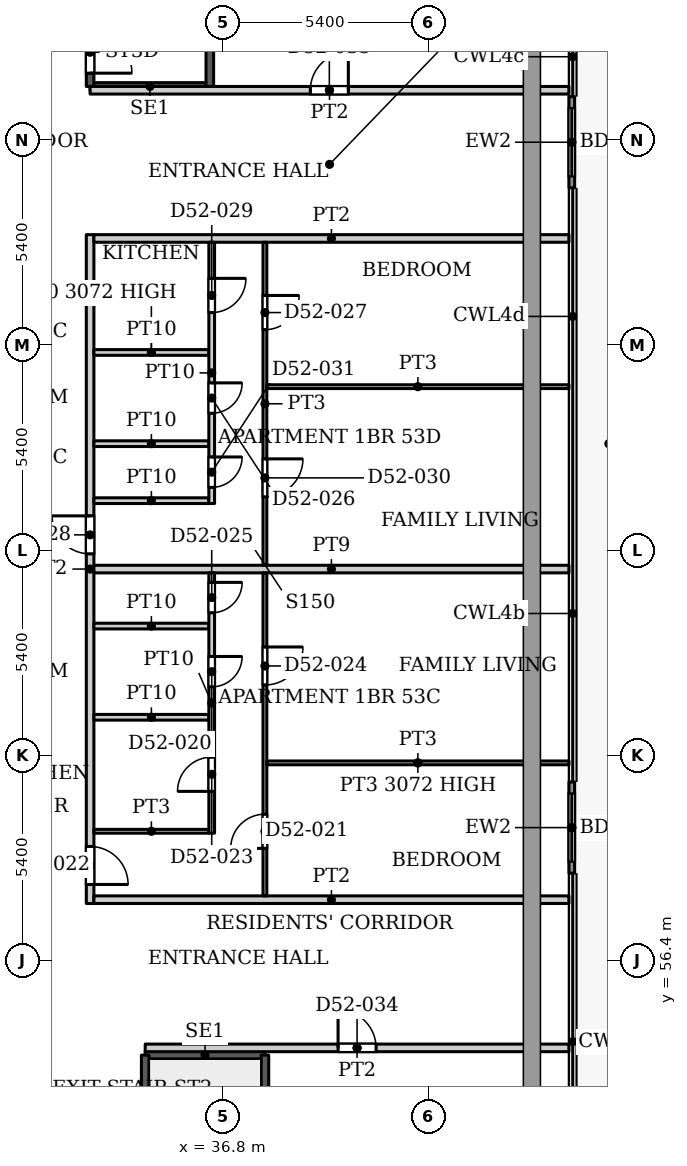
"""IFC4 building model, lengths in metres.
Left out: names, types, materials, properties, quantities, classifications, styles, units other than length and angle.
Written with IfcOpenShell. Run it as: python <this file> out.ifc"""

import sys

from ifc_helpers import new_model, si_unit, direction, frame, frame_2d, origin, place, context, subcontext, project, spatial, rectangle, extrude, source, transform, mapped, element, fill, save


model = new_model("IFC4")
c1 = context("Model", 3, precision=1e-05, world=origin(), true_north=direction((0.0, 1.0)))
c2 = subcontext(c1, "Body", "Model", "MODEL_VIEW")
j1 = project(units=[si_unit("LENGTHUNIT", "METRE"), si_unit("PLANEANGLEUNIT", "RADIAN")], contexts=[c1])
p1 = place(None, origin())
s1 = spatial("IfcSite", under=j1, at=p1, CompositionType="ELEMENT")
p2 = place(p1, origin())
s2 = spatial("IfcBuilding", under=s1, at=p2, CompositionType="ELEMENT")
p3 = place(p2, frame((0.0, 0.0, 227.9)))
s3 = spatial("IfcBuildingStorey", under=s2, at=p3, CompositionType="ELEMENT", Elevation=227.9)
p4 = place(p3, frame((45.975, 79.132, 0.0), z_axis=(0.0, 0.0, 1.0), x_axis=(0.0, -1.0, 0.0)))
e1 = element("IfcWall", 1, at=p4, inside=s3, PredefinedType="SOLIDWALL", context=c2, shape_type="SweptSolid", body=[
    extrude(rectangle(XDim=2.399, YDim=0.15, at=frame_2d((1.2, 0.0))), origin(), (0.0, 0.0, 1.0), 3.75),
])
p5 = place(p4, frame((0.3, 0.0, 0.0)))
e2 = element("IfcOpeningElement", 2, at=p5, cuts=e1, PredefinedType="OPENING", context=c2, shape_type="SweptSolid", body=[
    extrude(rectangle(XDim=1.8, YDim=2.4, at=frame_2d((0.9, 1.2))), frame((0.0, 0.085, 0.0), z_axis=(0.0, -1.0, 0.0), x_axis=(1.0, 0.0, 0.0)), (0.0, 0.0, 1.0), 0.17),
])
p6 = place(p3, frame((45.975, 61.097, 0.0), z_axis=(0.0, 0.0, 1.0), x_axis=(0.0, -1.0, 0.0)))
e3 = element("IfcWall", 3, at=p6, inside=s3, PredefinedType="SOLIDWALL", context=c2, shape_type="SweptSolid", body=[
    extrude(rectangle(XDim=2.4, YDim=0.15, at=frame_2d((1.2, 0.0))), origin(), (0.0, 0.0, 1.0), 3.75),
])
p7 = place(p6, frame((0.3, 0.0, 0.0)))
e4 = element("IfcOpeningElement", 4, at=p7, cuts=e3, PredefinedType="OPENING", context=c2, shape_type="SweptSolid", body=[
    extrude(rectangle(XDim=1.8, YDim=2.4, at=frame_2d((0.9, 1.2))), frame((0.0, 0.085, 0.0), z_axis=(0.0, -1.0, 0.0), x_axis=(1.0, 0.0, 0.0)), (0.0, 0.0, 1.0), 0.17),
])
p8 = place(p3, frame((34.75, 53.91, 0.0), z_axis=(0.0, 0.0, 1.0), x_axis=(1.0, 0.0, 0.0)))
e5 = element("IfcWall", 5, at=p8, inside=s3, PredefinedType="SHEAR", context=c2, shape_type="SweptSolid", body=[
    extrude(rectangle(XDim=3.15, YDim=0.2, at=frame_2d((1.575, 0.0))), origin(), (0.0, 0.0, 1.0), 3.9),
])
p9 = place(p3, frame((34.75, 47.5, 0.0), z_axis=(0.0, 0.0, 1.0), x_axis=(0.0, 1.0, 0.0)))
e6 = element("IfcWall", 6, at=p9, inside=s3, PredefinedType="SHEAR", context=c2, shape_type="SweptSolid", body=[
    extrude(rectangle(XDim=6.41, YDim=0.2, at=frame_2d((3.205, 0.0))), origin(), (0.0, 0.0, 1.0), 3.9),
])
p10 = place(p3, frame((37.9, 44.75, 0.0), z_axis=(0.0, 0.0, 1.0), x_axis=(0.0, 1.0, 0.0)))
e7 = element("IfcWall", 7, at=p10, inside=s3, PredefinedType="SHEAR", context=c2, shape_type="SweptSolid", body=[
    extrude(rectangle(XDim=9.16, YDim=0.2, at=frame_2d((4.58, 0.0))), origin(), (0.0, 0.0, 1.0), 3.9),
])
p11 = place(p3, frame((33.3, 79.4, 0.0), z_axis=(0.0, 0.0, 1.0), x_axis=(1.0, 0.0, 0.0)))
e8 = element("IfcWall", 8, at=p11, inside=s3, PredefinedType="SHEAR", context=c2, shape_type="SweptSolid", body=[
    extrude(rectangle(XDim=3.15, YDim=0.2, at=frame_2d((1.575, 0.0))), origin(), (0.0, 0.0, 1.0), 3.9),
])
p12 = place(p3, frame((33.3, 79.4, 0.0), z_axis=(0.0, 0.0, 1.0), x_axis=(0.0, 1.0, 0.0)))
e9 = element("IfcWall", 9, at=p12, inside=s3, PredefinedType="SHEAR", context=c2, shape_type="SweptSolid", body=[
    extrude(rectangle(XDim=9.16, YDim=0.2, at=frame_2d((4.58, 0.0))), origin(), (0.0, 0.0, 1.0), 3.9),
])
p13 = place(p12, frame((0.35, 0.0, 0.0)))
e10 = element("IfcOpeningElement", 10, at=p13, cuts=e9, PredefinedType="OPENING", context=c2, shape_type="SweptSolid", body=[
    extrude(rectangle(XDim=1.1, YDim=2.2, at=frame_2d((0.55, 1.1))), frame((0.0, 0.11, 0.0), z_axis=(0.0, -1.0, 0.0), x_axis=(1.0, 0.0, 0.0)), (0.0, 0.0, 1.0), 0.22),
])
p14 = place(p3, frame((36.45, 79.4, 0.0), z_axis=(0.0, 0.0, 1.0), x_axis=(0.0, 1.0, 0.0)))
e11 = element("IfcWall", 11, at=p14, inside=s3, PredefinedType="SHEAR", context=c2, shape_type="SweptSolid", body=[
    extrude(rectangle(XDim=9.16, YDim=0.2, at=frame_2d((4.58, 0.0))), origin(), (0.0, 0.0, 1.0), 3.9),
])
p15 = place(p3, frame((33.3, 57.9, 0.0), z_axis=(0.0, 0.0, 1.0), x_axis=(0.0, 1.0, 0.0)))
e12 = element("IfcWall", 12, at=p15, inside=s3, PredefinedType="PARTITIONING", context=c2, shape_type="SweptSolid", body=[
    extrude(rectangle(XDim=17.6, YDim=0.2, at=frame_2d((8.8, 0.0))), origin(), (0.0, 0.0, 1.0), 3.6),
])
p16 = place(p15, frame((0.5, 0.0, 0.0)))
e13 = element("IfcOpeningElement", 13, at=p16, cuts=e12, PredefinedType="OPENING", context=c2, shape_type="SweptSolid", body=[
    extrude(rectangle(XDim=1.0, YDim=2.1, at=frame_2d((0.5, 1.05))), frame((0.0, 0.11, 0.0), z_axis=(0.0, -1.0, 0.0), x_axis=(1.0, 0.0, 0.0)), (0.0, 0.0, 1.0), 0.22),
])
p17 = place(p15, frame((9.2, 0.0, 0.0)))
e14 = element("IfcOpeningElement", 14, at=p17, cuts=e12, PredefinedType="OPENING", context=c2, shape_type="SweptSolid", body=[
    extrude(rectangle(XDim=1.0, YDim=2.1, at=frame_2d((0.5, 1.05))), frame((0.0, 0.11, 0.0), z_axis=(0.0, -1.0, 0.0), x_axis=(1.0, 0.0, 0.0)), (0.0, 0.0, 1.0), 0.22),
])
p18 = place(p3, frame((33.3, 79.3, 0.0), z_axis=(0.0, 0.0, 1.0), x_axis=(1.0, 0.0, 0.0)))
e15 = element("IfcWall", 15, at=p18, inside=s3, PredefinedType="PARTITIONING", context=c2, shape_type="SweptSolid", body=[
    extrude(rectangle(XDim=12.6, YDim=0.2, at=frame_2d((6.3, 0.0))), origin(), (0.0, 0.0, 1.0), 3.6),
])
p19 = place(p18, frame((5.795, 0.0, 0.0)))
e16 = element("IfcOpeningElement", 16, at=p19, cuts=e15, PredefinedType="OPENING", context=c2, shape_type="SweptSolid", body=[
    extrude(rectangle(XDim=1.0, YDim=2.1, at=frame_2d((0.5, 1.05))), frame((0.0, 0.11, 0.0), z_axis=(0.0, -1.0, 0.0), x_axis=(1.0, 0.0, 0.0)), (0.0, 0.0, 1.0), 0.22),
])
p20 = place(p3, frame((33.4, 58.0, 0.0), z_axis=(0.0, 0.0, 1.0), x_axis=(1.0, 0.0, 0.0)))
e17 = element("IfcWall", 17, at=p20, inside=s3, PredefinedType="PARTITIONING", context=c2, shape_type="SweptSolid", body=[
    extrude(rectangle(XDim=12.5, YDim=0.2, at=frame_2d((6.25, 0.0))), origin(), (0.0, 0.0, 1.0), 3.6),
])
p21 = place(p3, frame((33.4, 59.8, 0.0), z_axis=(0.0, 0.0, 1.0), x_axis=(1.0, 0.0, 0.0)))
e18 = element("IfcWall", 18, at=p21, inside=s3, PredefinedType="PARTITIONING", context=c2, shape_type="SweptSolid", body=[
    extrude(rectangle(XDim=3.025, YDim=0.1, at=frame_2d((1.513, 0.0))), origin(), (0.0, 0.0, 1.0), 3.6),
])
for number, where, z_axis, x_axis in (
    (19, (33.4, 62.8, 0.0), (0.0, 0.0, 1.0), (1.0, 0.0, 0.0)),
    (20, (33.4, 65.2, 0.0), (0.0, 0.0, 1.0), (1.0, 0.0, 0.0)),
):
    element("IfcWall", number, at=place(p3, frame(where, z_axis=z_axis, x_axis=x_axis)), inside=s3, PredefinedType="PARTITIONING", context=c2, shape_type="SweptSolid", body=[
        extrude(rectangle(XDim=3.025, YDim=0.15, at=frame_2d((1.513, 0.0))), origin(), (0.0, 0.0, 1.0), 3.6),
    ])
p22 = place(p3, frame((33.4, 66.7, 0.0), z_axis=(0.0, 0.0, 1.0), x_axis=(1.0, 0.0, 0.0)))
e21 = element("IfcWall", 21, at=p22, inside=s3, PredefinedType="PARTITIONING", context=c2, shape_type="SweptSolid", body=[
    extrude(rectangle(XDim=12.5, YDim=0.2, at=frame_2d((6.25, 0.0))), origin(), (0.0, 0.0, 1.0), 3.6),
])
for number, where, z_axis, x_axis in (
    (22, (33.4, 68.5, 0.0), (0.0, 0.0, 1.0), (1.0, 0.0, 0.0)),
    (23, (33.4, 70.0, 0.0), (0.0, 0.0, 1.0), (1.0, 0.0, 0.0)),
):
    element("IfcWall", number, at=place(p3, frame(where, z_axis=z_axis, x_axis=x_axis)), inside=s3, PredefinedType="PARTITIONING", context=c2, shape_type="SweptSolid", body=[
        extrude(rectangle(XDim=3.025, YDim=0.15, at=frame_2d((1.513, 0.0))), origin(), (0.0, 0.0, 1.0), 3.6),
    ])
p23 = place(p3, frame((33.4, 72.4, 0.0), z_axis=(0.0, 0.0, 1.0), x_axis=(1.0, 0.0, 0.0)))
e24 = element("IfcWall", 24, at=p23, inside=s3, PredefinedType="PARTITIONING", context=c2, shape_type="SweptSolid", body=[
    extrude(rectangle(XDim=3.025, YDim=0.15, at=frame_2d((1.513, 0.0))), origin(), (0.0, 0.0, 1.0), 3.072),
])
p24 = place(p3, frame((33.4, 75.4, 0.0), z_axis=(0.0, 0.0, 1.0), x_axis=(1.0, 0.0, 0.0)))
e25 = element("IfcWall", 25, at=p24, inside=s3, PredefinedType="PARTITIONING", context=c2, shape_type="SweptSolid", body=[
    extrude(rectangle(XDim=12.5, YDim=0.2, at=frame_2d((6.25, 0.0))), origin(), (0.0, 0.0, 1.0), 3.6),
])
p25 = place(p3, frame((34.75, 54.1, 0.0), z_axis=(0.0, 0.0, 1.0), x_axis=(1.0, 0.0, 0.0)))
e26 = element("IfcWall", 26, at=p25, inside=s3, PredefinedType="PARTITIONING", context=c2, shape_type="SweptSolid", body=[
    extrude(rectangle(XDim=11.15, YDim=0.2, at=frame_2d((5.575, 0.0))), origin(), (0.0, 0.0, 1.0), 3.6),
])
p26 = place(p25, frame((5.075, 0.0, 0.0)))
e27 = element("IfcOpeningElement", 27, at=p26, cuts=e26, PredefinedType="OPENING", context=c2, shape_type="SweptSolid", body=[
    extrude(rectangle(XDim=1.0, YDim=2.1, at=frame_2d((0.5, 1.05))), frame((0.0, 0.11, 0.0), z_axis=(0.0, -1.0, 0.0), x_axis=(1.0, 0.0, 0.0)), (0.0, 0.0, 1.0), 0.22),
])
p27 = place(p3, frame((36.5, 59.75, 0.0), z_axis=(0.0, 0.0, 1.0), x_axis=(0.0, 1.0, 0.0)))
e28 = element("IfcWall", 28, at=p27, inside=s3, PredefinedType="PARTITIONING", context=c2, shape_type="SweptSolid", body=[
    extrude(rectangle(XDim=6.85, YDim=0.15, at=frame_2d((3.425, 0.0))), origin(), (0.0, 0.0, 1.0), 3.6),
])
p28 = place(p27, frame((3.85, 0.0, 0.0)))
e29 = element("IfcOpeningElement", 29, at=p28, cuts=e28, PredefinedType="OPENING", context=c2, shape_type="SweptSolid", body=[
    extrude(rectangle(XDim=0.8, YDim=2.1, at=frame_2d((0.4, 1.05))), frame((0.0, 0.085, 0.0), z_axis=(0.0, -1.0, 0.0), x_axis=(1.0, 0.0, 0.0)), (0.0, 0.0, 1.0), 0.17),
])
p29 = place(p27, frame((1.1, 0.0, 0.0)))
e30 = element("IfcOpeningElement", 30, at=p29, cuts=e28, PredefinedType="OPENING", context=c2, shape_type="SweptSolid", body=[
    extrude(rectangle(XDim=0.9, YDim=2.1, at=frame_2d((0.45, 1.05))), frame((0.0, 0.085, 0.0), z_axis=(0.0, -1.0, 0.0), x_axis=(1.0, 0.0, 0.0)), (0.0, 0.0, 1.0), 0.17),
])
p30 = place(p27, frame((5.8, 0.0, 0.0)))
e31 = element("IfcOpeningElement", 31, at=p30, cuts=e28, PredefinedType="OPENING", context=c2, shape_type="SweptSolid", body=[
    extrude(rectangle(XDim=0.8, YDim=2.1, at=frame_2d((0.4, 1.05))), frame((0.0, 0.085, 0.0), z_axis=(0.0, -1.0, 0.0), x_axis=(1.0, 0.0, 0.0)), (0.0, 0.0, 1.0), 0.17),
])
p31 = place(p3, frame((36.5, 68.425, 0.0), z_axis=(0.0, 0.0, 1.0), x_axis=(0.0, 1.0, 0.0)))
e32 = element("IfcWall", 32, at=p31, inside=s3, PredefinedType="PARTITIONING", context=c2, shape_type="SweptSolid", body=[
    extrude(rectangle(XDim=6.875, YDim=0.15, at=frame_2d((3.438, 0.0))), origin(), (0.0, 0.0, 1.0), 3.6),
])
p32 = place(p31, frame((2.375, 0.0, 0.0)))
e33 = element("IfcOpeningElement", 33, at=p32, cuts=e32, PredefinedType="OPENING", context=c2, shape_type="SweptSolid", body=[
    extrude(rectangle(XDim=0.8, YDim=2.1, at=frame_2d((0.4, 1.05))), frame((0.0, 0.085, 0.0), z_axis=(0.0, -1.0, 0.0), x_axis=(1.0, 0.0, 0.0)), (0.0, 0.0, 1.0), 0.17),
])
p33 = place(p31, frame((5.025, 0.0, 0.0)))
e34 = element("IfcOpeningElement", 34, at=p33, cuts=e32, PredefinedType="OPENING", context=c2, shape_type="SweptSolid", body=[
    extrude(rectangle(XDim=0.9, YDim=2.1, at=frame_2d((0.45, 1.05))), frame((0.0, 0.085, 0.0), z_axis=(0.0, -1.0, 0.0), x_axis=(1.0, 0.0, 0.0)), (0.0, 0.0, 1.0), 0.17),
])
p34 = place(p31, frame((0.425, 0.0, 0.0)))
e35 = element("IfcOpeningElement", 35, at=p34, cuts=e32, PredefinedType="OPENING", context=c2, shape_type="SweptSolid", body=[
    extrude(rectangle(XDim=0.8, YDim=2.1, at=frame_2d((0.4, 1.05))), frame((0.0, 0.085, 0.0), z_axis=(0.0, -1.0, 0.0), x_axis=(1.0, 0.0, 0.0)), (0.0, 0.0, 1.0), 0.17),
])
p35 = place(p3, frame((37.9, 58.1, 0.0), z_axis=(0.0, 0.0, 1.0), x_axis=(0.0, 1.0, 0.0)))
e36 = element("IfcWall", 36, at=p35, inside=s3, PredefinedType="PARTITIONING", context=c2, shape_type="SweptSolid", body=[
    extrude(rectangle(XDim=8.5, YDim=0.1, at=frame_2d((4.25, 0.0))), origin(), (0.0, 0.0, 1.0), 3.6),
])
p36 = place(p35, frame((1.25, 0.0, 0.0)))
e37 = element("IfcOpeningElement", 37, at=p36, cuts=e36, PredefinedType="OPENING", context=c2, shape_type="SweptSolid", body=[
    extrude(rectangle(XDim=0.9, YDim=2.1, at=frame_2d((0.45, 1.05))), frame((0.0, 0.06, 0.0), z_axis=(0.0, -1.0, 0.0), x_axis=(1.0, 0.0, 0.0)), (0.0, 0.0, 1.0), 0.12),
])
p37 = place(p35, frame((5.55, 0.0, 0.0)))
e38 = element("IfcOpeningElement", 38, at=p37, cuts=e36, PredefinedType="OPENING", context=c2, shape_type="SweptSolid", body=[
    extrude(rectangle(XDim=1.0, YDim=2.1, at=frame_2d((0.5, 1.05))), frame((0.0, 0.06, 0.0), z_axis=(0.0, -1.0, 0.0), x_axis=(1.0, 0.0, 0.0)), (0.0, 0.0, 1.0), 0.12),
])
p38 = place(p3, frame((37.9, 66.8, 0.0), z_axis=(0.0, 0.0, 1.0), x_axis=(0.0, 1.0, 0.0)))
e39 = element("IfcWall", 39, at=p38, inside=s3, PredefinedType="PARTITIONING", context=c2, shape_type="SweptSolid", body=[
    extrude(rectangle(XDim=8.5, YDim=0.1, at=frame_2d((4.25, 0.0))), origin(), (0.0, 0.0, 1.0), 3.6),
])
p39 = place(p38, frame((6.2, 0.0, 0.0)))
e40 = element("IfcOpeningElement", 40, at=p39, cuts=e39, PredefinedType="OPENING", context=c2, shape_type="SweptSolid", body=[
    extrude(rectangle(XDim=0.9, YDim=2.1, at=frame_2d((0.45, 1.05))), frame((0.0, 0.06, 0.0), z_axis=(0.0, -1.0, 0.0), x_axis=(1.0, 0.0, 0.0)), (0.0, 0.0, 1.0), 0.12),
])
p40 = place(p38, frame((1.8, 0.0, 0.0)))
e41 = element("IfcOpeningElement", 41, at=p40, cuts=e39, PredefinedType="OPENING", context=c2, shape_type="SweptSolid", body=[
    extrude(rectangle(XDim=1.0, YDim=2.1, at=frame_2d((0.5, 1.05))), frame((0.0, 0.06, 0.0), z_axis=(0.0, -1.0, 0.0), x_axis=(1.0, 0.0, 0.0)), (0.0, 0.0, 1.0), 0.12),
])
p41 = place(p3, frame((37.95, 61.6, 0.0), z_axis=(0.0, 0.0, 1.0), x_axis=(1.0, 0.0, 0.0)))
e42 = element("IfcWall", 42, at=p41, inside=s3, PredefinedType="PARTITIONING", context=c2, shape_type="SweptSolid", body=[
    extrude(rectangle(XDim=7.95, YDim=0.1, at=frame_2d((3.975, 0.0))), origin(), (0.0, 0.0, 1.0), 3.072),
])
p42 = place(p3, frame((37.95, 71.5, 0.0), z_axis=(0.0, 0.0, 1.0), x_axis=(1.0, 0.0, 0.0)))
e43 = element("IfcWall", 43, at=p42, inside=s3, PredefinedType="PARTITIONING", context=c2, shape_type="SweptSolid", body=[
    extrude(rectangle(XDim=7.95, YDim=0.1, at=frame_2d((3.975, 0.0))), origin(), (0.0, 0.0, 1.0), 3.6),
])
m1 = source(origin(), c2, "Body", "SweptSolid", [
    extrude(rectangle(XDim=1.8, YDim=2.4, at=frame_2d((0.9, 1.2))), frame((0.0, 0.025, 0.0), z_axis=(0.0, -1.0, 0.0), x_axis=(1.0, 0.0, 0.0)), (0.0, 0.0, 1.0), 0.05),
])
p43 = place(p5, origin())
e44 = element("IfcDoor", 44, at=p43, inside=s3, OperationType="SLIDING_TO_LEFT", PredefinedType="DOOR", context=c2, shape_type="MappedRepresentation", body=[
    mapped(m1, transform((0.0, 0.0, 0.0), x_axis=(1.0, 0.0, 0.0), y_axis=(0.0, 1.0, 0.0), z_axis=(0.0, 0.0, 1.0), scale=1.0)),
])
fill(e2, e44)
p44 = place(p7, origin())
e45 = element("IfcDoor", 45, at=p44, inside=s3, OperationType="SLIDING_TO_LEFT", PredefinedType="DOOR", context=c2, shape_type="MappedRepresentation", body=[
    mapped(m1, transform((0.0, 0.0, 0.0), x_axis=(1.0, 0.0, 0.0), y_axis=(0.0, 1.0, 0.0), z_axis=(0.0, 0.0, 1.0), scale=1.0)),
])
fill(e4, e45)
m2 = source(origin(), c2, "Body", "SweptSolid", [
    extrude(rectangle(XDim=1.1, YDim=2.2, at=frame_2d((0.55, 1.1))), frame((0.0, 0.025, 0.0), z_axis=(0.0, -1.0, 0.0), x_axis=(1.0, 0.0, 0.0)), (0.0, 0.0, 1.0), 0.05),
])
p45 = place(p13, origin())
e46 = element("IfcDoor", 46, at=p45, inside=s3, OperationType="SINGLE_SWING_RIGHT", PredefinedType="DOOR", context=c2, shape_type="MappedRepresentation", body=[
    mapped(m2, transform((0.0, 0.0, 0.0), x_axis=(1.0, 0.0, 0.0), y_axis=(0.0, 1.0, 0.0), z_axis=(0.0, 0.0, 1.0), scale=1.0)),
])
fill(e10, e46)
m3 = source(origin(), c2, "Body", "SweptSolid", [
    extrude(rectangle(XDim=0.8, YDim=2.1, at=frame_2d((0.4, 1.05))), frame((0.0, 0.025, 0.0), z_axis=(0.0, -1.0, 0.0), x_axis=(1.0, 0.0, 0.0)), (0.0, 0.0, 1.0), 0.05),
])
p46 = place(p28, origin())
e47 = element("IfcDoor", 47, at=p46, inside=s3, OperationType="SINGLE_SWING_RIGHT", PredefinedType="DOOR", context=c2, shape_type="MappedRepresentation", body=[
    mapped(m3, transform((0.0, 0.0, 0.0), x_axis=(1.0, 0.0, 0.0), y_axis=(0.0, 1.0, 0.0), z_axis=(0.0, 0.0, 1.0), scale=1.0)),
])
fill(e29, e47)
m4 = source(origin(), c2, "Body", "SweptSolid", [
    extrude(rectangle(XDim=0.9, YDim=2.1, at=frame_2d((0.45, 1.05))), frame((0.0, 0.025, 0.0), z_axis=(0.0, -1.0, 0.0), x_axis=(1.0, 0.0, 0.0)), (0.0, 0.0, 1.0), 0.05),
])
p47 = place(p36, origin())
e48 = element("IfcDoor", 48, at=p47, inside=s3, OperationType="SINGLE_SWING_LEFT", PredefinedType="DOOR", context=c2, shape_type="MappedRepresentation", body=[
    mapped(m4, transform((0.0, 0.0, 0.0), x_axis=(1.0, 0.0, 0.0), y_axis=(0.0, 1.0, 0.0), z_axis=(0.0, 0.0, 1.0), scale=1.0)),
])
fill(e37, e48)
m5 = source(origin(), c2, "Body", "SweptSolid", [
    extrude(rectangle(XDim=1.0, YDim=2.1, at=frame_2d((0.5, 1.05))), frame((0.0, 0.025, 0.0), z_axis=(0.0, -1.0, 0.0), x_axis=(1.0, 0.0, 0.0)), (0.0, 0.0, 1.0), 0.05),
])
p48 = place(p16, origin())
e49 = element("IfcDoor", 49, at=p48, inside=s3, OperationType="SINGLE_SWING_RIGHT", PredefinedType="DOOR", context=c2, shape_type="MappedRepresentation", body=[
    mapped(m5, transform((0.0, 0.0, 0.0), x_axis=(1.0, 0.0, 0.0), y_axis=(0.0, 1.0, 0.0), z_axis=(0.0, 0.0, 1.0), scale=1.0)),
])
fill(e13, e49)
p49 = place(p29, origin())
e50 = element("IfcDoor", 50, at=p49, inside=s3, OperationType="SINGLE_SWING_LEFT", PredefinedType="DOOR", context=c2, shape_type="MappedRepresentation", body=[
    mapped(m4, transform((0.0, 0.0, 0.0), x_axis=(1.0, 0.0, 0.0), y_axis=(0.0, 1.0, 0.0), z_axis=(0.0, 0.0, 1.0), scale=1.0)),
])
fill(e30, e50)
m6 = source(origin(), c2, "Body", "SweptSolid", [
    extrude(rectangle(XDim=1.0, YDim=2.1, at=frame_2d((0.5, 1.05))), frame((0.0, 0.025, 0.0), z_axis=(0.0, -1.0, 0.0), x_axis=(1.0, 0.0, 0.0)), (0.0, 0.0, 1.0), 0.05),
])
p50 = place(p37, origin())
e51 = element("IfcDoor", 51, at=p50, inside=s3, OperationType="SINGLE_SWING_RIGHT", PredefinedType="DOOR", context=c2, shape_type="MappedRepresentation", body=[
    mapped(m6, transform((0.0, 0.0, 0.0), x_axis=(1.0, 0.0, 0.0), y_axis=(0.0, 1.0, 0.0), z_axis=(0.0, 0.0, 1.0), scale=1.0)),
])
fill(e38, e51)
p51 = place(p30, origin())
e52 = element("IfcDoor", 52, at=p51, inside=s3, OperationType="SINGLE_SWING_RIGHT", PredefinedType="DOOR", context=c2, shape_type="MappedRepresentation", body=[
    mapped(m3, transform((0.0, 0.0, 0.0), x_axis=(1.0, 0.0, 0.0), y_axis=(0.0, 1.0, 0.0), z_axis=(0.0, 0.0, 1.0), scale=1.0)),
])
fill(e31, e52)
p52 = place(p32, origin())
e53 = element("IfcDoor", 53, at=p52, inside=s3, OperationType="SINGLE_SWING_RIGHT", PredefinedType="DOOR", context=c2, shape_type="MappedRepresentation", body=[
    mapped(m3, transform((0.0, 0.0, 0.0), x_axis=(1.0, 0.0, 0.0), y_axis=(0.0, 1.0, 0.0), z_axis=(0.0, 0.0, 1.0), scale=1.0)),
])
fill(e33, e53)
p53 = place(p39, origin())
e54 = element("IfcDoor", 54, at=p53, inside=s3, OperationType="SINGLE_SWING_RIGHT", PredefinedType="DOOR", context=c2, shape_type="MappedRepresentation", body=[
    mapped(m4, transform((0.0, 0.0, 0.0), x_axis=(1.0, 0.0, 0.0), y_axis=(0.0, 1.0, 0.0), z_axis=(0.0, 0.0, 1.0), scale=1.0)),
])
fill(e40, e54)
p54 = place(p17, origin())
e55 = element("IfcDoor", 55, at=p54, inside=s3, OperationType="SINGLE_SWING_LEFT", PredefinedType="DOOR", context=c2, shape_type="MappedRepresentation", body=[
    mapped(m5, transform((0.0, 0.0, 0.0), x_axis=(1.0, 0.0, 0.0), y_axis=(0.0, 1.0, 0.0), z_axis=(0.0, 0.0, 1.0), scale=1.0)),
])
fill(e14, e55)
p55 = place(p33, origin())
e56 = element("IfcDoor", 56, at=p55, inside=s3, OperationType="SINGLE_SWING_RIGHT", PredefinedType="DOOR", context=c2, shape_type="MappedRepresentation", body=[
    mapped(m4, transform((0.0, 0.0, 0.0), x_axis=(1.0, 0.0, 0.0), y_axis=(0.0, 1.0, 0.0), z_axis=(0.0, 0.0, 1.0), scale=1.0)),
])
fill(e34, e56)
p56 = place(p40, origin())
e57 = element("IfcDoor", 57, at=p56, inside=s3, OperationType="SINGLE_SWING_RIGHT", PredefinedType="DOOR", context=c2, shape_type="MappedRepresentation", body=[
    mapped(m6, transform((0.0, 0.0, 0.0), x_axis=(1.0, 0.0, 0.0), y_axis=(0.0, 1.0, 0.0), z_axis=(0.0, 0.0, 1.0), scale=1.0)),
])
fill(e41, e57)
p57 = place(p34, origin())
e58 = element("IfcDoor", 58, at=p57, inside=s3, OperationType="SINGLE_SWING_RIGHT", PredefinedType="DOOR", context=c2, shape_type="MappedRepresentation", body=[
    mapped(m3, transform((0.0, 0.0, 0.0), x_axis=(1.0, 0.0, 0.0), y_axis=(0.0, 1.0, 0.0), z_axis=(0.0, 0.0, 1.0), scale=1.0)),
])
fill(e35, e58)
m7 = source(origin(), c2, "Body", "SweptSolid", [
    extrude(rectangle(XDim=1.0, YDim=2.1, at=frame_2d((0.5, 1.05))), frame((0.0, 0.025, 0.0), z_axis=(0.0, -1.0, 0.0), x_axis=(1.0, 0.0, 0.0)), (0.0, 0.0, 1.0), 0.05),
])
p58 = place(p26, origin())
e59 = element("IfcDoor", 59, at=p58, inside=s3, OperationType="SINGLE_SWING_LEFT", PredefinedType="DOOR", context=c2, shape_type="MappedRepresentation", body=[
    mapped(m7, transform((0.0, 0.0, 0.0), x_axis=(1.0, 0.0, 0.0), y_axis=(0.0, 1.0, 0.0), z_axis=(0.0, 0.0, 1.0), scale=1.0)),
])
fill(e27, e59)
p59 = place(p19, origin())
e60 = element("IfcDoor", 60, at=p59, inside=s3, OperationType="SINGLE_SWING_LEFT", PredefinedType="DOOR", context=c2, shape_type="MappedRepresentation", body=[
    mapped(m7, transform((0.0, 0.0, 0.0), x_axis=(1.0, 0.0, 0.0), y_axis=(0.0, 1.0, 0.0), z_axis=(0.0, 0.0, 1.0), scale=1.0)),
])
fill(e16, e60)
save(model, sys.argv[1])
